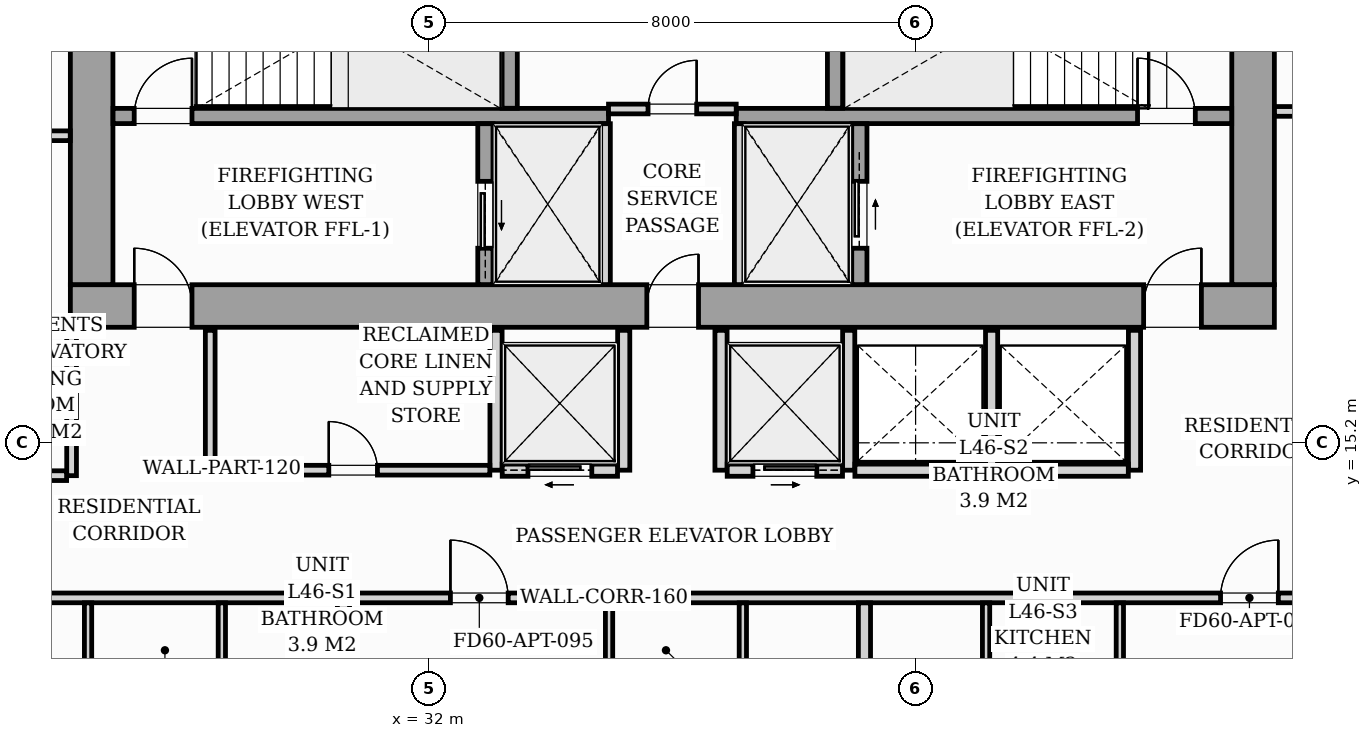
"""IFC4 building model, lengths in metres.
Left out: names, types, materials, properties, quantities, classifications, styles, units other than length and angle.
Written with IfcOpenShell. Run it as: python <this file> out.ifc"""

import sys

from ifc_helpers import new_model, si_unit, direction, frame, frame_2d, origin, origin_2d, place, context, subcontext, project, spatial, rectangle, i_section, extrude, source, transform, mapped, element, fill, save


model = new_model("IFC4")
c1 = context("Model", 3, precision=1e-05, world=origin(), true_north=direction((0.0, 1.0)))
c2 = subcontext(c1, "Body", "Model", "MODEL_VIEW")
j1 = project(units=[si_unit("LENGTHUNIT", "METRE"), si_unit("PLANEANGLEUNIT", "RADIAN")], contexts=[c1])
p1 = place(None, origin())
s1 = spatial("IfcSite", under=j1, at=p1, CompositionType="ELEMENT")
p2 = place(p1, origin())
s2 = spatial("IfcBuilding", under=s1, at=p2, CompositionType="ELEMENT")
p3 = place(p2, frame((0.0, 0.0, 159.8)))
s3 = spatial("IfcBuildingStorey", under=s2, at=p3, CompositionType="ELEMENT", Elevation=159.8)
m1 = source(origin(), c2, "Body", "SweptSolid", [
    extrude(i_section(OverallWidth=0.421, OverallDepth=0.465, WebThickness=0.045, FlangeThickness=0.073, FilletRadius=0.018, at=origin_2d()), origin(), (0.0, 0.0, 1.0), 3.196),
])
for number, where, z_axis, x_axis in (
    (1, (26.4, 17.4, 0.002), (0.0, 0.0, 1.0), (1.0, 0.0, 0.0)),
    (2, (33.12, 17.4, 0.002), (0.0, 0.0, 1.0), (1.0, 0.0, 0.0)),
    (3, (38.88, 17.4, 0.002), (0.0, 0.0, 1.0), (1.0, 0.0, 0.0)),
    (4, (45.6, 17.4, 0.002), (0.0, 0.0, 1.0), (1.0, 0.0, 0.0)),
):
    element("IfcColumn", number, at=place(p3, frame(where, z_axis=z_axis, x_axis=x_axis)), inside=s3, PredefinedType="PILASTER", context=c2, shape_type="MappedRepresentation", body=[
        mapped(m1, transform((0.0, 0.0, 0.0), scale=1.0)),
    ])
p4 = place(p3, frame((26.1, 17.45, 0.0), z_axis=(0.0, 0.0, 1.0), x_axis=(1.0, 0.0, 0.0)))
e5 = element("IfcWall", 5, at=p4, inside=s3, PredefinedType="SHEAR", context=c2, shape_type="SweptSolid", body=[
    extrude(rectangle(XDim=19.8, YDim=0.7, at=frame_2d((9.9, 0.0))), origin(), (0.0, 0.0, 1.0), 3.2),
])
p5 = place(p4, frame((1.05, 0.0, 0.0)))
e6 = element("IfcOpeningElement", 6, at=p5, cuts=e5, PredefinedType="OPENING", context=c2, shape_type="SweptSolid", body=[
    extrude(rectangle(XDim=0.95, YDim=2.06, at=frame_2d((0.475, 1.03))), frame((0.0, 0.36, 0.0), z_axis=(0.0, -1.0, 0.0), x_axis=(1.0, 0.0, 0.0)), (0.0, 0.0, 1.0), 0.72),
])
p6 = place(p4, frame((9.48, 0.0, 0.0)))
e7 = element("IfcOpeningElement", 7, at=p6, cuts=e5, PredefinedType="OPENING", context=c2, shape_type="SweptSolid", body=[
    extrude(rectangle(XDim=0.85, YDim=2.0, at=frame_2d((0.425, 1.0))), frame((0.0, 0.36, 0.0), z_axis=(0.0, -1.0, 0.0), x_axis=(1.0, 0.0, 0.0)), (0.0, 0.0, 1.0), 0.72),
])
p7 = place(p4, frame((17.65, 0.0, 0.0)))
e8 = element("IfcOpeningElement", 8, at=p7, cuts=e5, PredefinedType="OPENING", context=c2, shape_type="SweptSolid", body=[
    extrude(rectangle(XDim=0.95, YDim=2.06, at=frame_2d((0.475, 1.03))), frame((0.0, 0.36, 0.0), z_axis=(0.0, -1.0, 0.0), x_axis=(1.0, 0.0, 0.0)), (0.0, 0.0, 1.0), 0.72),
])
for number, where, z_axis, x_axis in (
    (9, (26.45, 17.802, 0.0), (0.0, 0.0, 1.0), (0.0, 1.0, 0.0)),
    (10, (45.55, 17.802, 0.0), (0.0, 0.0, 1.0), (0.0, 1.0, 0.0)),
):
    element("IfcWall", number, at=place(p3, frame(where, z_axis=z_axis, x_axis=x_axis)), inside=s3, PredefinedType="SHEAR", context=c2, shape_type="SweptSolid", body=[
        extrude(rectangle(XDim=5.796, YDim=0.7, at=frame_2d((2.898, 0.0))), origin(), (0.0, 0.0, 1.0), 3.2),
    ])
p8 = place(p3, frame((26.802, 20.575, 0.0), z_axis=(0.0, 0.0, 1.0), x_axis=(1.0, 0.0, 0.0)))
e11 = element("IfcWall", 11, at=p8, inside=s3, PredefinedType="SOLIDWALL", context=c2, shape_type="SweptSolid", body=[
    extrude(rectangle(XDim=8.148, YDim=0.25, at=frame_2d((4.074, 0.0))), origin(), (0.0, 0.0, 1.0), 3.2),
])
p9 = place(p8, frame((0.348, 0.0, 0.0)))
e12 = element("IfcOpeningElement", 12, at=p9, cuts=e11, PredefinedType="OPENING", context=c2, shape_type="SweptSolid", body=[
    extrude(rectangle(XDim=0.95, YDim=2.06, at=frame_2d((0.475, 1.03))), frame((0.0, 0.135, 0.0), z_axis=(0.0, -1.0, 0.0), x_axis=(1.0, 0.0, 0.0)), (0.0, 0.0, 1.0), 0.27),
])
p10 = place(p3, frame((37.05, 20.575, 0.0), z_axis=(0.0, 0.0, 1.0), x_axis=(1.0, 0.0, 0.0)))
e13 = element("IfcWall", 13, at=p10, inside=s3, PredefinedType="SOLIDWALL", context=c2, shape_type="SweptSolid", body=[
    extrude(rectangle(XDim=8.148, YDim=0.25, at=frame_2d((4.074, 0.0))), origin(), (0.0, 0.0, 1.0), 3.2),
])
p11 = place(p10, frame((6.6, 0.0, 0.0)))
e14 = element("IfcOpeningElement", 14, at=p11, cuts=e13, PredefinedType="OPENING", context=c2, shape_type="SweptSolid", body=[
    extrude(rectangle(XDim=0.95, YDim=2.06, at=frame_2d((0.475, 1.03))), frame((0.0, 0.135, 0.0), z_axis=(0.0, -1.0, 0.0), x_axis=(1.0, 0.0, 0.0)), (0.0, 0.0, 1.0), 0.27),
])
for number, where, z_axis, x_axis in (
    (15, (33.325, 20.702, 0.0), (0.0, 0.0, 1.0), (0.0, 1.0, 0.0)),
    (16, (38.675, 20.702, 0.0), (0.0, 0.0, 1.0), (0.0, 1.0, 0.0)),
):
    element("IfcWall", number, at=place(p3, frame(where, z_axis=z_axis, x_axis=x_axis)), inside=s3, PredefinedType="SOLIDWALL", context=c2, shape_type="SweptSolid", body=[
        extrude(rectangle(XDim=2.896, YDim=0.25, at=frame_2d((1.448, 0.0))), origin(), (0.0, 0.0, 1.0), 3.2),
    ])
p12 = place(p3, frame((32.925, 17.802, 0.0), z_axis=(0.0, 0.0, 1.0), x_axis=(0.0, 1.0, 0.0)))
e17 = element("IfcWall", 17, at=p12, inside=s3, PredefinedType="SOLIDWALL", context=c2, shape_type="SweptSolid", body=[
    extrude(rectangle(XDim=2.646, YDim=0.25, at=frame_2d((1.323, 0.0))), origin(), (0.0, 0.0, 1.0), 3.2),
])
p13 = place(p12, frame((0.598, 0.0, 0.0)))
e18 = element("IfcOpeningElement", 18, at=p13, cuts=e17, PredefinedType="OPENING", context=c2, shape_type="SweptSolid", body=[
    extrude(rectangle(XDim=1.1, YDim=2.08, at=frame_2d((0.55, 1.04))), frame((0.0, 0.135, 0.0), z_axis=(0.0, -1.0, 0.0), x_axis=(1.0, 0.0, 0.0)), (0.0, 0.0, 1.0), 0.27),
])
for number, where, z_axis, x_axis in (
    (19, (34.9, 17.802, 0.0), (0.0, 0.0, 1.0), (0.0, 1.0, 0.0)),
    (20, (37.1, 17.802, 0.0), (0.0, 0.0, 1.0), (0.0, 1.0, 0.0)),
):
    element("IfcWall", number, at=place(p3, frame(where, z_axis=z_axis, x_axis=x_axis)), inside=s3, PredefinedType="PARTITIONING", context=c2, shape_type="SweptSolid", body=[
        extrude(rectangle(XDim=2.646, YDim=0.16, at=frame_2d((1.323, 0.0))), origin(), (0.0, 0.0, 1.0), 2.9),
    ])
p14 = place(p3, frame((39.075, 17.802, 0.0), z_axis=(0.0, 0.0, 1.0), x_axis=(0.0, 1.0, 0.0)))
e21 = element("IfcWall", 21, at=p14, inside=s3, PredefinedType="SOLIDWALL", context=c2, shape_type="SweptSolid", body=[
    extrude(rectangle(XDim=2.646, YDim=0.25, at=frame_2d((1.323, 0.0))), origin(), (0.0, 0.0, 1.0), 3.2),
])
p15 = place(p14, frame((0.598, 0.0, 0.0)))
e22 = element("IfcOpeningElement", 22, at=p15, cuts=e21, PredefinedType="OPENING", context=c2, shape_type="SweptSolid", body=[
    extrude(rectangle(XDim=1.1, YDim=2.08, at=frame_2d((0.55, 1.04))), frame((0.0, 0.135, 0.0), z_axis=(0.0, -1.0, 0.0), x_axis=(1.0, 0.0, 0.0)), (0.0, 0.0, 1.0), 0.27),
])
p16 = place(p3, frame((34.95, 20.69, 0.0), z_axis=(0.0, 0.0, 1.0), x_axis=(1.0, 0.0, 0.0)))
e23 = element("IfcWall", 23, at=p16, inside=s3, PredefinedType="PARTITIONING", context=c2, shape_type="SweptSolid", body=[
    extrude(rectangle(XDim=2.1, YDim=0.16, at=frame_2d((1.05, 0.0))), origin(), (0.0, 0.0, 1.0), 2.9),
])
p17 = place(p16, frame((0.65, 0.0, 0.0)))
e24 = element("IfcOpeningElement", 24, at=p17, cuts=e23, PredefinedType="OPENING", context=c2, shape_type="SweptSolid", body=[
    extrude(rectangle(XDim=0.8, YDim=2.05, at=frame_2d((0.4, 1.025))), frame((0.0, 0.09, 0.0), z_axis=(0.0, -1.0, 0.0), x_axis=(1.0, 0.0, 0.0)), (0.0, 0.0, 1.0), 0.18),
])
p18 = place(p3, frame((28.4, 14.75, 0.0), z_axis=(0.0, 0.0, 1.0), x_axis=(0.0, 1.0, 0.0)))
e25 = element("IfcWall", 25, at=p18, inside=s3, PredefinedType="PARTITIONING", context=c2, shape_type="SweptSolid", body=[
    extrude(rectangle(XDim=2.3, YDim=0.16, at=frame_2d((1.15, 0.0))), origin(), (0.0, 0.0, 1.0), 2.9),
])
p19 = place(p3, frame((33.1, 14.75, 0.0), z_axis=(0.0, 0.0, 1.0), x_axis=(0.0, 1.0, 0.0)))
e26 = element("IfcWall", 26, at=p19, inside=s3, PredefinedType="PARTITIONING", context=c2, shape_type="SweptSolid", body=[
    extrude(rectangle(XDim=2.3, YDim=0.2, at=frame_2d((1.15, 0.0))), origin(), (0.0, 0.0, 1.0), 2.9),
])
p20 = place(p3, frame((28.482, 14.75, 0.0), z_axis=(0.0, 0.0, 1.0), x_axis=(1.0, 0.0, 0.0)))
e27 = element("IfcWall", 27, at=p20, inside=s3, PredefinedType="PARTITIONING", context=c2, shape_type="SweptSolid", body=[
    extrude(rectangle(XDim=4.516, YDim=0.16, at=frame_2d((2.258, 0.0))), origin(), (0.0, 0.0, 1.0), 2.9),
])
p21 = place(p20, frame((1.868, 0.0, 0.0)))
e28 = element("IfcOpeningElement", 28, at=p21, cuts=e27, PredefinedType="OPENING", context=c2, shape_type="SweptSolid", body=[
    extrude(rectangle(XDim=0.8, YDim=2.05, at=frame_2d((0.4, 1.025))), frame((0.0, 0.09, 0.0), z_axis=(0.0, -1.0, 0.0), x_axis=(1.0, 0.0, 0.0)), (0.0, 0.0, 1.0), 0.18),
])
p22 = place(p3, frame((35.2, 14.75, 0.0), z_axis=(0.0, 0.0, 1.0), x_axis=(0.0, 1.0, 0.0)))
e29 = element("IfcWall", 29, at=p22, inside=s3, PredefinedType="PARTITIONING", context=c2, shape_type="SweptSolid", body=[
    extrude(rectangle(XDim=2.3, YDim=0.2, at=frame_2d((1.15, 0.0))), origin(), (0.0, 0.0, 1.0), 2.9),
])
p23 = place(p3, frame((33.202, 14.75, 0.0), z_axis=(0.0, 0.0, 1.0), x_axis=(1.0, 0.0, 0.0)))
e30 = element("IfcWall", 30, at=p23, inside=s3, PredefinedType="PARTITIONING", context=c2, shape_type="SweptSolid", body=[
    extrude(rectangle(XDim=1.896, YDim=0.2, at=frame_2d((0.948, 0.0))), origin(), (0.0, 0.0, 1.0), 2.9),
])
p24 = place(p23, frame((0.423, 0.0, 0.0)))
e31 = element("IfcOpeningElement", 31, at=p24, cuts=e30, PredefinedType="OPENING", context=c2, shape_type="SweptSolid", body=[
    extrude(rectangle(XDim=1.05, YDim=2.08, at=frame_2d((0.525, 1.04))), frame((0.0, 0.11, 0.0), z_axis=(0.0, -1.0, 0.0), x_axis=(1.0, 0.0, 0.0)), (0.0, 0.0, 1.0), 0.22),
])
for number, where, z_axis, x_axis in (
    (32, (36.8, 14.75, 0.0), (0.0, 0.0, 1.0), (0.0, 1.0, 0.0)),
    (33, (38.9, 14.75, 0.0), (0.0, 0.0, 1.0), (0.0, 1.0, 0.0)),
):
    element("IfcWall", number, at=place(p3, frame(where, z_axis=z_axis, x_axis=x_axis)), inside=s3, PredefinedType="PARTITIONING", context=c2, shape_type="SweptSolid", body=[
        extrude(rectangle(XDim=2.3, YDim=0.2, at=frame_2d((1.15, 0.0))), origin(), (0.0, 0.0, 1.0), 2.9),
    ])
p25 = place(p3, frame((36.902, 14.75, 0.0), z_axis=(0.0, 0.0, 1.0), x_axis=(1.0, 0.0, 0.0)))
e34 = element("IfcWall", 34, at=p25, inside=s3, PredefinedType="PARTITIONING", context=c2, shape_type="SweptSolid", body=[
    extrude(rectangle(XDim=1.896, YDim=0.2, at=frame_2d((0.948, 0.0))), origin(), (0.0, 0.0, 1.0), 2.9),
])
p26 = place(p25, frame((0.423, 0.0, 0.0)))
e35 = element("IfcOpeningElement", 35, at=p26, cuts=e34, PredefinedType="OPENING", context=c2, shape_type="SweptSolid", body=[
    extrude(rectangle(XDim=1.05, YDim=2.08, at=frame_2d((0.525, 1.04))), frame((0.0, 0.11, 0.0), z_axis=(0.0, -1.0, 0.0), x_axis=(1.0, 0.0, 0.0)), (0.0, 0.0, 1.0), 0.22),
])
for number, where, z_axis, x_axis in (
    (36, (41.25, 14.75, 0.0), (0.0, 0.0, 1.0), (0.0, 1.0, 0.0)),
    (37, (43.6, 14.75, 0.0), (0.0, 0.0, 1.0), (0.0, 1.0, 0.0)),
):
    element("IfcWall", number, at=place(p3, frame(where, z_axis=z_axis, x_axis=x_axis)), inside=s3, PredefinedType="PARTITIONING", context=c2, shape_type="SweptSolid", body=[
        extrude(rectangle(XDim=2.3, YDim=0.2, at=frame_2d((1.15, 0.0))), origin(), (0.0, 0.0, 1.0), 2.9),
    ])
for number, where, z_axis, x_axis in (
    (38, (39.002, 14.75, 0.0), (0.0, 0.0, 1.0), (1.0, 0.0, 0.0)),
    (39, (41.352, 14.75, 0.0), (0.0, 0.0, 1.0), (1.0, 0.0, 0.0)),
):
    element("IfcWall", number, at=place(p3, frame(where, z_axis=z_axis, x_axis=x_axis)), inside=s3, PredefinedType="PARTITIONING", context=c2, shape_type="SweptSolid", body=[
        extrude(rectangle(XDim=2.146, YDim=0.2, at=frame_2d((1.073, 0.0))), origin(), (0.0, 0.0, 1.0), 2.9),
    ])
p27 = place(p3, frame((22.05, 12.65, 0.0), z_axis=(0.0, 0.0, 1.0), x_axis=(1.0, 0.0, 0.0)))
e40 = element("IfcWall", 40, at=p27, inside=s3, PredefinedType="PARTITIONING", context=c2, shape_type="SweptSolid", body=[
    extrude(rectangle(XDim=25.65, YDim=0.16, at=frame_2d((12.825, 0.0))), origin(), (0.0, 0.0, 1.0), 2.9),
])
p28 = place(p27, frame((1.736, 0.0, 0.0)))
e41 = element("IfcOpeningElement", 41, at=p28, cuts=e40, PredefinedType="OPENING", context=c2, shape_type="SweptSolid", body=[
    extrude(rectangle(XDim=0.95, YDim=2.06, at=frame_2d((0.475, 1.03))), frame((0.0, 0.09, 0.0), z_axis=(0.0, -1.0, 0.0), x_axis=(1.0, 0.0, 0.0)), (0.0, 0.0, 1.0), 0.18),
])
p29 = place(p27, frame((10.3, 0.0, 0.0)))
e42 = element("IfcOpeningElement", 42, at=p29, cuts=e40, PredefinedType="OPENING", context=c2, shape_type="SweptSolid", body=[
    extrude(rectangle(XDim=0.95, YDim=2.06, at=frame_2d((0.475, 1.03))), frame((0.0, 0.09, 0.0), z_axis=(0.0, -1.0, 0.0), x_axis=(1.0, 0.0, 0.0)), (0.0, 0.0, 1.0), 0.18),
])
p30 = place(p27, frame((22.965, 0.0, 0.0)))
e43 = element("IfcOpeningElement", 43, at=p30, cuts=e40, PredefinedType="OPENING", context=c2, shape_type="SweptSolid", body=[
    extrude(rectangle(XDim=0.95, YDim=2.06, at=frame_2d((0.475, 1.03))), frame((0.0, 0.09, 0.0), z_axis=(0.0, -1.0, 0.0), x_axis=(1.0, 0.0, 0.0)), (0.0, 0.0, 1.0), 0.18),
])
p31 = place(p3, frame((45.902, 20.65, 0.0), z_axis=(0.0, 0.0, 1.0), x_axis=(1.0, 0.0, 0.0)))
e44 = element("IfcWall", 44, at=p31, inside=s3, PredefinedType="PARTITIONING", context=c2, shape_type="SweptSolid", body=[
    extrude(rectangle(XDim=1.716, YDim=0.16, at=frame_2d((0.858, 0.0))), origin(), (0.0, 0.0, 1.0), 2.9),
])
for number, where, z_axis, x_axis in (
    (45, (26.391, 10.462, 0.0), (0.0, 0.0, 1.0), (0.0, 1.0, 0.0)),
    (46, (28.591, 10.462, 0.0), (0.0, 0.0, 1.0), (0.0, 1.0, 0.0)),
):
    element("IfcWall", number, at=place(p3, frame(where, z_axis=z_axis, x_axis=x_axis)), inside=s3, PredefinedType="PARTITIONING", context=c2, shape_type="SweptSolid", body=[
        extrude(rectangle(XDim=2.106, YDim=0.12, at=frame_2d((1.053, 0.0))), origin(), (0.0, 0.0, 1.0), 2.9),
    ])
p32 = place(p3, frame((30.591, 10.462, 0.0), z_axis=(0.0, 0.0, 1.0), x_axis=(0.0, 1.0, 0.0)))
e47 = element("IfcWall", 47, at=p32, inside=s3, PredefinedType="PARTITIONING", context=c2, shape_type="SweptSolid", body=[
    extrude(rectangle(XDim=2.106, YDim=0.2, at=frame_2d((1.053, 0.0))), origin(), (0.0, 0.0, 1.0), 2.9),
])
for number, where, z_axis, x_axis in (
    (48, (34.959, 10.462, 0.0), (0.0, 0.0, 1.0), (0.0, 1.0, 0.0)),
    (49, (37.159, 10.462, 0.0), (0.0, 0.0, 1.0), (0.0, 1.0, 0.0)),
):
    element("IfcWall", number, at=place(p3, frame(where, z_axis=z_axis, x_axis=x_axis)), inside=s3, PredefinedType="PARTITIONING", context=c2, shape_type="SweptSolid", body=[
        extrude(rectangle(XDim=2.106, YDim=0.12, at=frame_2d((1.053, 0.0))), origin(), (0.0, 0.0, 1.0), 2.9),
    ])
p33 = place(p3, frame((39.159, 10.462, 0.0), z_axis=(0.0, 0.0, 1.0), x_axis=(0.0, 1.0, 0.0)))
e50 = element("IfcWall", 50, at=p33, inside=s3, PredefinedType="PARTITIONING", context=c2, shape_type="SweptSolid", body=[
    extrude(rectangle(XDim=2.106, YDim=0.2, at=frame_2d((1.053, 0.0))), origin(), (0.0, 0.0, 1.0), 2.9),
])
for number, where, z_axis, x_axis in (
    (51, (43.359, 10.462, 0.0), (0.0, 0.0, 1.0), (0.0, 1.0, 0.0)),
    (52, (41.159, 10.462, 0.0), (0.0, 0.0, 1.0), (0.0, 1.0, 0.0)),
):
    element("IfcWall", number, at=place(p3, frame(where, z_axis=z_axis, x_axis=x_axis)), inside=s3, PredefinedType="PARTITIONING", context=c2, shape_type="SweptSolid", body=[
        extrude(rectangle(XDim=2.106, YDim=0.12, at=frame_2d((1.053, 0.0))), origin(), (0.0, 0.0, 1.0), 2.9),
    ])
p34 = place(p3, frame((24.182, 20.25, 0.0), z_axis=(0.0, 0.0, 1.0), x_axis=(1.0, 0.0, 0.0)))
e53 = element("IfcWall", 53, at=p34, inside=s3, PredefinedType="PARTITIONING", context=c2, shape_type="SweptSolid", body=[
    extrude(rectangle(XDim=1.916, YDim=0.16, at=frame_2d((0.958, 0.0))), origin(), (0.0, 0.0, 1.0), 2.9),
])
p35 = place(p3, frame((26.12, 14.66, 0.0), z_axis=(0.0, 0.0, 1.0), x_axis=(0.0, 1.0, 0.0)))
e54 = element("IfcWall", 54, at=p35, inside=s3, PredefinedType="PARTITIONING", context=c2, shape_type="SweptSolid", body=[
    extrude(rectangle(XDim=2.438, YDim=0.16, at=frame_2d((1.219, 0.0))), origin(), (0.0, 0.0, 1.0), 2.9),
])
p36 = place(p3, frame((24.182, 14.66, 0.0), z_axis=(0.0, 0.0, 1.0), x_axis=(1.0, 0.0, 0.0)))
e55 = element("IfcWall", 55, at=p36, inside=s3, PredefinedType="PARTITIONING", context=c2, shape_type="SweptSolid", body=[
    extrude(rectangle(XDim=1.856, YDim=0.16, at=frame_2d((0.928, 0.0))), origin(), (0.0, 0.0, 1.0), 2.9),
])
m2 = source(origin(), c2, "Body", "SweptSolid", [
    extrude(rectangle(XDim=0.95, YDim=2.06, at=frame_2d((0.475, 1.03))), frame((0.0, 0.025, 0.0), z_axis=(0.0, -1.0, 0.0), x_axis=(1.0, 0.0, 0.0)), (0.0, 0.0, 1.0), 0.05),
])
p37 = place(p5, origin())
e56 = element("IfcDoor", 56, at=p37, inside=s3, OperationType="SINGLE_SWING_LEFT", PredefinedType="DOOR", context=c2, shape_type="MappedRepresentation", body=[
    mapped(m2, transform((0.0, 0.0, 0.0), scale=1.0)),
])
fill(e6, e56)
m3 = source(origin(), c2, "Body", "SweptSolid", [
    extrude(rectangle(XDim=0.85, YDim=2.0, at=frame_2d((0.425, 1.0))), frame((0.0, 0.025, 0.0), z_axis=(0.0, -1.0, 0.0), x_axis=(1.0, 0.0, 0.0)), (0.0, 0.0, 1.0), 0.05),
])
p38 = place(p6, origin())
e57 = element("IfcDoor", 57, at=p38, inside=s3, OperationType="SINGLE_SWING_RIGHT", PredefinedType="DOOR", context=c2, shape_type="MappedRepresentation", body=[
    mapped(m3, transform((0.0, 0.0, 0.0), scale=1.0)),
])
fill(e7, e57)
p39 = place(p7, origin())
e58 = element("IfcDoor", 58, at=p39, inside=s3, OperationType="SINGLE_SWING_RIGHT", PredefinedType="DOOR", context=c2, shape_type="MappedRepresentation", body=[
    mapped(m2, transform((0.0, 0.0, 0.0), scale=1.0)),
])
fill(e8, e58)
p40 = place(p9, origin())
e59 = element("IfcDoor", 59, at=p40, inside=s3, OperationType="SINGLE_SWING_RIGHT", PredefinedType="DOOR", context=c2, shape_type="MappedRepresentation", body=[
    mapped(m2, transform((0.0, 0.0, 0.0), scale=1.0)),
])
fill(e12, e59)
p41 = place(p11, origin())
e60 = element("IfcDoor", 60, at=p41, inside=s3, OperationType="SINGLE_SWING_LEFT", PredefinedType="DOOR", context=c2, shape_type="MappedRepresentation", body=[
    mapped(m2, transform((0.0, 0.0, 0.0), scale=1.0)),
])
fill(e14, e60)
m4 = source(origin(), c2, "Body", "SweptSolid", [
    extrude(rectangle(XDim=1.1, YDim=2.08, at=frame_2d((0.55, 1.04))), frame((0.0, 0.025, 0.0), z_axis=(0.0, -1.0, 0.0), x_axis=(1.0, 0.0, 0.0)), (0.0, 0.0, 1.0), 0.05),
])
p42 = place(p13, origin())
e61 = element("IfcDoor", 61, at=p42, inside=s3, OperationType="SLIDING_TO_LEFT", PredefinedType="DOOR", context=c2, shape_type="MappedRepresentation", body=[
    mapped(m4, transform((0.0, 0.0, 0.0), scale=1.0)),
])
fill(e18, e61)
p43 = place(p15, origin())
e62 = element("IfcDoor", 62, at=p43, inside=s3, OperationType="SLIDING_TO_RIGHT", PredefinedType="DOOR", context=c2, shape_type="MappedRepresentation", body=[
    mapped(m4, transform((0.0, 0.0, 0.0), scale=1.0)),
])
fill(e22, e62)
m5 = source(origin(), c2, "Body", "SweptSolid", [
    extrude(rectangle(XDim=0.8, YDim=2.05, at=frame_2d((0.4, 1.025))), frame((0.0, 0.025, 0.0), z_axis=(0.0, -1.0, 0.0), x_axis=(1.0, 0.0, 0.0)), (0.0, 0.0, 1.0), 0.05),
])
p44 = place(p17, origin())
e63 = element("IfcDoor", 63, at=p44, inside=s3, OperationType="SINGLE_SWING_RIGHT", PredefinedType="DOOR", context=c2, shape_type="MappedRepresentation", body=[
    mapped(m5, transform((0.0, 0.0, 0.0), scale=1.0)),
])
fill(e24, e63)
p45 = place(p21, origin())
e64 = element("IfcDoor", 64, at=p45, inside=s3, OperationType="SINGLE_SWING_LEFT", PredefinedType="DOOR", context=c2, shape_type="MappedRepresentation", body=[
    mapped(m5, transform((0.0, 0.0, 0.0), scale=1.0)),
])
fill(e28, e64)
m6 = source(origin(), c2, "Body", "SweptSolid", [
    extrude(rectangle(XDim=1.05, YDim=2.08, at=frame_2d((0.525, 1.04))), frame((0.0, 0.025, 0.0), z_axis=(0.0, -1.0, 0.0), x_axis=(1.0, 0.0, 0.0)), (0.0, 0.0, 1.0), 0.05),
])
p46 = place(p24, origin())
e65 = element("IfcDoor", 65, at=p46, inside=s3, OperationType="SLIDING_TO_LEFT", PredefinedType="DOOR", context=c2, shape_type="MappedRepresentation", body=[
    mapped(m6, transform((0.0, 0.0, 0.0), scale=1.0)),
])
fill(e31, e65)
p47 = place(p26, origin())
e66 = element("IfcDoor", 66, at=p47, inside=s3, OperationType="SLIDING_TO_RIGHT", PredefinedType="DOOR", context=c2, shape_type="MappedRepresentation", body=[
    mapped(m6, transform((0.0, 0.0, 0.0), scale=1.0)),
])
fill(e35, e66)
m7 = source(origin(), c2, "Body", "SweptSolid", [
    extrude(rectangle(XDim=0.95, YDim=2.06, at=frame_2d((0.475, 1.03))), frame((0.0, 0.025, 0.0), z_axis=(0.0, -1.0, 0.0), x_axis=(1.0, 0.0, 0.0)), (0.0, 0.0, 1.0), 0.05),
])
p48 = place(p29, origin())
e67 = element("IfcDoor", 67, at=p48, inside=s3, OperationType="SINGLE_SWING_LEFT", PredefinedType="DOOR", context=c2, shape_type="MappedRepresentation", body=[
    mapped(m7, transform((0.0, 0.0, 0.0), scale=1.0)),
])
fill(e42, e67)
p49 = place(p30, origin())
e68 = element("IfcDoor", 68, at=p49, inside=s3, OperationType="SINGLE_SWING_RIGHT", PredefinedType="DOOR", context=c2, shape_type="MappedRepresentation", body=[
    mapped(m7, transform((0.0, 0.0, 0.0), scale=1.0)),
])
fill(e43, e68)
save(model, sys.argv[1])
